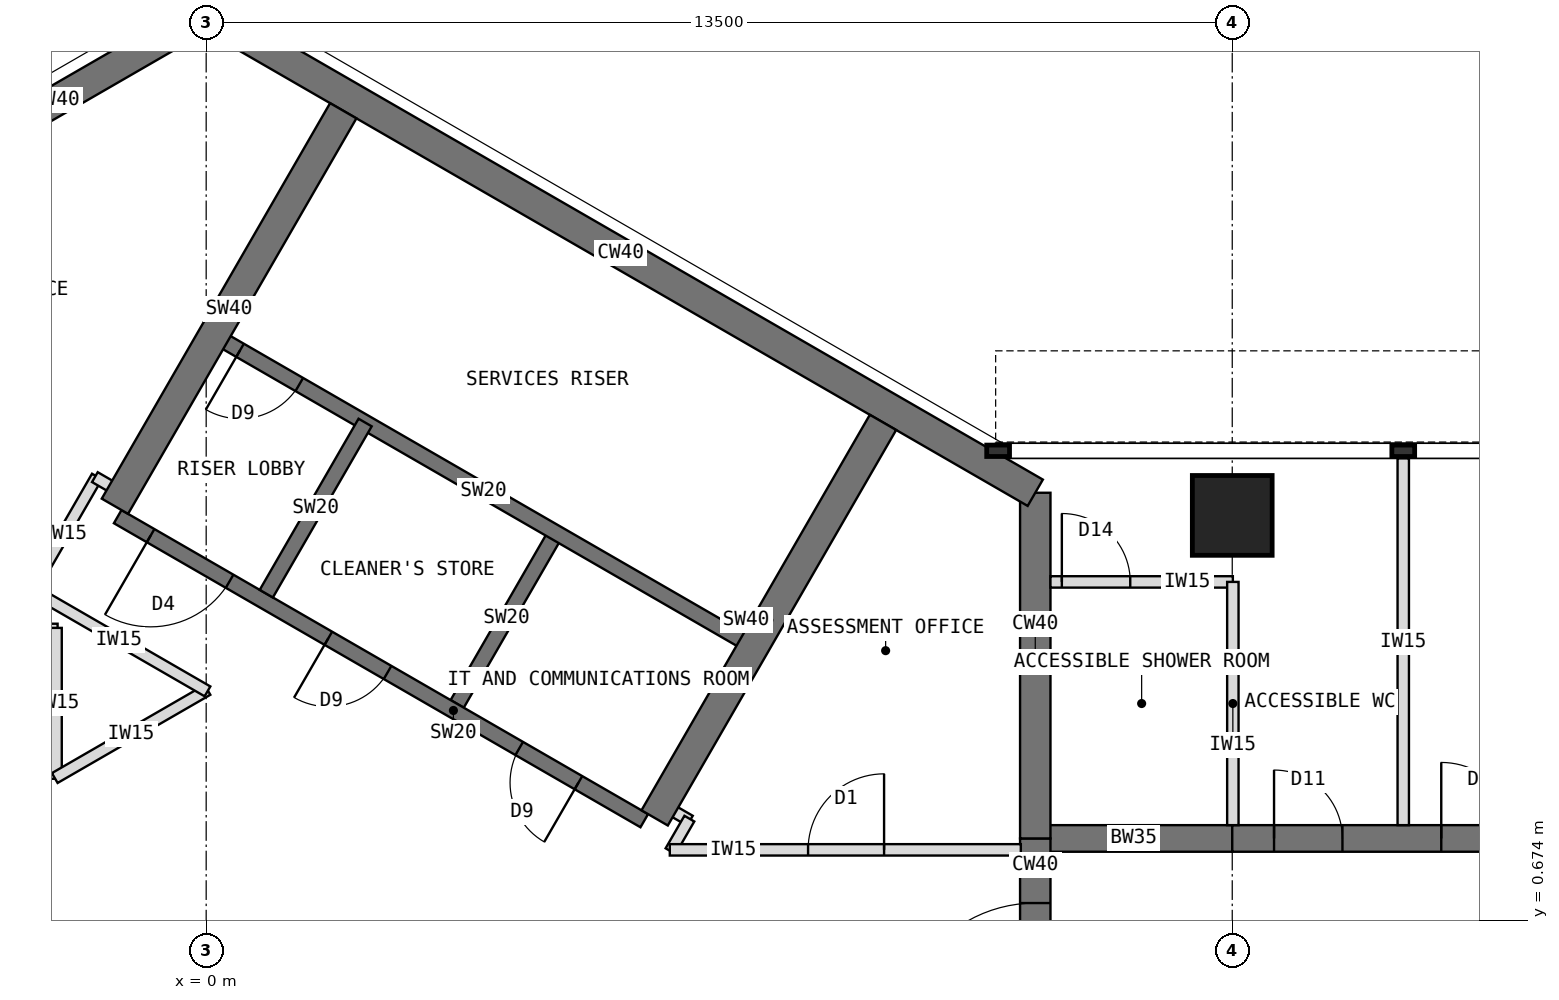
"""IFC4 building model, lengths in metres.
Left out: names, types, materials, properties, quantities, classifications, styles, units other than length and angle.
Written with IfcOpenShell. Run it as: python <this file> out.ifc"""

import sys

from ifc_helpers import new_model, si_unit, direction, frame, frame_2d, origin, origin_2d, place, context, subcontext, project, spatial, rectangle, extrude, element, fill, save


model = new_model("IFC4")
c1 = context("Model", 3, precision=1e-05, world=origin(), true_north=direction((0.0, 1.0)))
c2 = subcontext(c1, "Body", "Model", "MODEL_VIEW")
j1 = project(units=[si_unit("LENGTHUNIT", "METRE"), si_unit("PLANEANGLEUNIT", "RADIAN")], contexts=[c1])
p1 = place(None, origin())
s1 = spatial("IfcSite", under=j1, at=p1, CompositionType="ELEMENT")
p2 = place(p1, origin())
s2 = spatial("IfcBuilding", under=s1, at=p2, CompositionType="ELEMENT")
p3 = place(p2, frame((0.0, 0.0, 251.5)))
s3 = spatial("IfcBuildingStorey", under=s2, at=p3, CompositionType="ELEMENT", Elevation=251.5)
p4 = place(p3, frame((10.908, -1.75, 0.0), z_axis=(0.0, 0.0, 1.0), x_axis=(0.0, 1.0, 0.0)))
e1 = element("IfcWall", 1, at=p4, inside=s3, PredefinedType="SHEAR", context=c2, shape_type="SweptSolid", body=[
    extrude(rectangle(XDim=3.5, YDim=0.4, at=frame_2d((1.75, 0.0))), origin(), (0.0, 0.0, 1.0), 4.0),
])
p5 = place(p4, frame((0.85, 0.0, 0.0)))
e2 = element("IfcOpeningElement", 2, at=p5, cuts=e1, PredefinedType="OPENING", context=c2, shape_type="SweptSolid", body=[
    extrude(rectangle(XDim=1.8, YDim=2.1, at=frame_2d((0.9, 1.05))), frame((0.0, 0.21, 0.0), z_axis=(0.0, -1.0, 0.0), x_axis=(1.0, 0.0, 0.0)), (0.0, 0.0, 1.0), 0.42),
])
p6 = place(p3, frame((10.908, 1.75, 0.0), z_axis=(0.0, 0.0, 1.0), x_axis=(0.0, 1.0, 0.0)))
e3 = element("IfcWall", 3, at=p6, inside=s3, PredefinedType="SHEAR", context=c2, shape_type="SweptSolid", body=[
    extrude(rectangle(XDim=4.548, YDim=0.4, at=frame_2d((2.274, 0.0))), origin(), (0.0, 0.0, 1.0), 4.0),
])
p7 = place(p3, frame((10.908, 6.298, 0.0), z_axis=(0.0, 0.0, 1.0), x_axis=(-0.866021940709, 0.500005998175, 0.0)))
e4 = element("IfcWall", 4, at=p7, inside=s3, PredefinedType="SHEAR", context=c2, shape_type="SweptSolid", body=[
    extrude(rectangle(XDim=12.596, YDim=0.4, at=frame_2d((6.298, 0.0))), origin(), (0.0, 0.0, 1.0), 4.0),
])
p8 = place(p3, frame((0.0, 12.596, 0.0), z_axis=(0.0, 0.0, 1.0), x_axis=(-0.866011268655, -0.500024481964, 0.0)))
e5 = element("IfcWall", 5, at=p8, inside=s3, PredefinedType="SHEAR", context=c2, shape_type="SweptSolid", body=[
    extrude(rectangle(XDim=4.548, YDim=0.4, at=frame_2d((2.274, 0.0))), origin(), (0.0, 0.0, 1.0), 4.0),
])
p9 = place(p3, frame((10.908, 1.75, 0.0), z_axis=(0.0, 0.0, 1.0), x_axis=(1.0, 0.0, 0.0)))
e6 = element("IfcWall", 6, at=p9, inside=s3, PredefinedType="SHEAR", context=c2, shape_type="SweptSolid", body=[
    extrude(rectangle(XDim=2.592, YDim=0.35, at=frame_2d((1.296, 0.0))), origin(), (0.0, 0.0, 1.0), 4.0),
])
p10 = place(p3, frame((13.5, 1.75, 0.0), z_axis=(0.0, 0.0, 1.0), x_axis=(1.0, 0.0, 0.0)))
e7 = element("IfcWall", 7, at=p10, inside=s3, PredefinedType="SHEAR", context=c2, shape_type="SweptSolid", body=[
    extrude(rectangle(XDim=13.2, YDim=0.35, at=frame_2d((6.6, 0.0))), origin(), (0.0, 0.0, 1.0), 4.0),
])
p11 = place(p10, frame((0.55, 0.0, 0.0)))
e8 = element("IfcOpeningElement", 8, at=p11, cuts=e7, PredefinedType="OPENING", context=c2, shape_type="SweptSolid", body=[
    extrude(rectangle(XDim=0.9, YDim=2.1, at=frame_2d((0.45, 1.05))), frame((0.0, 0.185, 0.0), z_axis=(0.0, -1.0, 0.0), x_axis=(1.0, 0.0, 0.0)), (0.0, 0.0, 1.0), 0.37),
])
p12 = place(p10, frame((2.75, 0.0, 0.0)))
e9 = element("IfcOpeningElement", 9, at=p12, cuts=e7, PredefinedType="OPENING", context=c2, shape_type="SweptSolid", body=[
    extrude(rectangle(XDim=1.0, YDim=2.1, at=frame_2d((0.5, 1.05))), frame((0.0, 0.185, 0.0), z_axis=(0.0, -1.0, 0.0), x_axis=(1.0, 0.0, 0.0)), (0.0, 0.0, 1.0), 0.37),
])
p13 = place(p10, frame((7.25, 0.0, 0.0)))
e10 = element("IfcOpeningElement", 10, at=p13, cuts=e7, PredefinedType="OPENING", context=c2, shape_type="SweptSolid", body=[
    extrude(rectangle(XDim=1.0, YDim=2.1, at=frame_2d((0.5, 1.05))), frame((0.0, 0.185, 0.0), z_axis=(0.0, -1.0, 0.0), x_axis=(1.0, 0.0, 0.0)), (0.0, 0.0, 1.0), 0.37),
])
p14 = place(p3, frame((13.5, 6.0, 0.0), z_axis=(0.0, 0.0, 1.0), x_axis=(1.0, 0.0, 0.0)))
e11 = element("IfcColumn", 11, at=p14, inside=s3, PredefinedType="COLUMN", context=c2, shape_type="SweptSolid", body=[
    extrude(rectangle(XDim=1.05, YDim=1.05, at=origin_2d()), origin(), (0.0, 0.0, 1.0), 4.0),
])
p15 = place(p3, frame((5.764, 1.984, 0.0), z_axis=(0.0, 0.0, 1.0), x_axis=(-0.866026010844, 0.49999894854, 0.0)))
e12 = element("IfcWall", 12, at=p15, inside=s3, PredefinedType="SHEAR", context=c2, shape_type="SweptSolid", body=[
    extrude(rectangle(XDim=8.0, YDim=0.2, at=frame_2d((4.0, 0.0))), origin(), (0.0, 0.0, 1.0), 4.0),
])
p16 = place(p15, frame((6.3, 0.0, 0.0)))
e13 = element("IfcOpeningElement", 13, at=p16, cuts=e12, PredefinedType="OPENING", context=c2, shape_type="SweptSolid", body=[
    extrude(rectangle(XDim=1.2, YDim=2.1, at=frame_2d((0.6, 1.05))), frame((0.0, 0.11, 0.0), z_axis=(0.0, -1.0, 0.0), x_axis=(1.0, 0.0, 0.0)), (0.0, 0.0, 1.0), 0.22),
])
p17 = place(p15, frame((1.0, 0.0, 0.0)))
e14 = element("IfcOpeningElement", 14, at=p17, cuts=e12, PredefinedType="OPENING", context=c2, shape_type="SweptSolid", body=[
    extrude(rectangle(XDim=0.9, YDim=2.1, at=frame_2d((0.45, 1.05))), frame((0.0, 0.11, 0.0), z_axis=(0.0, -1.0, 0.0), x_axis=(1.0, 0.0, 0.0)), (0.0, 0.0, 1.0), 0.22),
])
p18 = place(p15, frame((3.9, 0.0, 0.0)))
e15 = element("IfcOpeningElement", 15, at=p18, cuts=e12, PredefinedType="OPENING", context=c2, shape_type="SweptSolid", body=[
    extrude(rectangle(XDim=0.9, YDim=2.1, at=frame_2d((0.45, 1.05))), frame((0.0, 0.11, 0.0), z_axis=(0.0, -1.0, 0.0), x_axis=(1.0, 0.0, 0.0)), (0.0, 0.0, 1.0), 0.22),
])
for number, where, z_axis, x_axis in (
    (16, (3.303, 3.52, 0.0), (0.0, 0.0, 1.0), (0.5, 0.866, 0.0)),
    (17, (0.791, 4.97, 0.0), (0.0, 0.0, 1.0), (0.5, 0.866, 0.0)),
):
    element("IfcWall", number, at=place(p3, frame(where, z_axis=z_axis, x_axis=x_axis)), inside=s3, PredefinedType="SHEAR", context=c2, shape_type="SweptSolid", body=[
        extrude(rectangle(XDim=2.6, YDim=0.2, at=frame_2d((1.3, 0.0))), origin(), (0.0, 0.0, 1.0), 4.0),
    ])
p19 = place(p3, frame((7.114, 4.322, 0.0), z_axis=(0.0, 0.0, 1.0), x_axis=(-0.866026010844, 0.49999894854, 0.0)))
e18 = element("IfcWall", 18, at=p19, inside=s3, PredefinedType="SHEAR", context=c2, shape_type="SweptSolid", body=[
    extrude(rectangle(XDim=8.0, YDim=0.2, at=frame_2d((4.0, 0.0))), origin(), (0.0, 0.0, 1.0), 4.0),
])
p20 = place(p19, frame((6.8, 0.0, 0.0)))
e19 = element("IfcOpeningElement", 19, at=p20, cuts=e18, PredefinedType="OPENING", context=c2, shape_type="SweptSolid", body=[
    extrude(rectangle(XDim=0.9, YDim=2.1, at=frame_2d((0.45, 1.05))), frame((0.0, 0.11, 0.0), z_axis=(0.0, -1.0, 0.0), x_axis=(1.0, 0.0, 0.0)), (0.0, 0.0, 1.0), 0.22),
])
for number, where, z_axis, x_axis in (
    (20, (-1.201, 6.12, 0.0), (0.0, 0.0, 1.0), (0.5, 0.866, 0.0)),
    (21, (5.901, 2.02, 0.0), (0.0, 0.0, 1.0), (0.5, 0.866, 0.0)),
):
    element("IfcWall", number, at=place(p3, frame(where, z_axis=z_axis, x_axis=x_axis)), inside=s3, PredefinedType="SHEAR", context=c2, shape_type="SweptSolid", body=[
        extrude(rectangle(XDim=6.008, YDim=0.4, at=frame_2d((3.004, 0.0))), origin(), (0.0, 0.0, 1.0), 4.0),
    ])
p21 = place(p3, frame((15.75, 1.925, 0.0), z_axis=(0.0, 0.0, 1.0), x_axis=(0.0, 1.0, 0.0)))
e22 = element("IfcWall", 22, at=p21, inside=s3, PredefinedType="PARTITIONING", context=c2, shape_type="SweptSolid", body=[
    extrude(rectangle(XDim=4.825, YDim=0.15, at=frame_2d((2.413, 0.0))), origin(), (0.0, 0.0, 1.0), 3.8),
])
p22 = place(p3, frame((11.108, 5.125, 0.0), z_axis=(0.0, 0.0, 1.0), x_axis=(1.0, 0.0, 0.0)))
e23 = element("IfcWall", 23, at=p22, inside=s3, PredefinedType="PARTITIONING", context=c2, shape_type="SweptSolid", body=[
    extrude(rectangle(XDim=2.4, YDim=0.15, at=frame_2d((1.2, 0.0))), origin(), (0.0, 0.0, 1.0), 3.8),
])
p23 = place(p22, frame((0.15, 0.0, 0.0)))
e24 = element("IfcOpeningElement", 24, at=p23, cuts=e23, PredefinedType="OPENING", context=c2, shape_type="SweptSolid", body=[
    extrude(rectangle(XDim=0.9, YDim=2.1, at=frame_2d((0.45, 1.05))), frame((0.0, 0.085, 0.0), z_axis=(0.0, -1.0, 0.0), x_axis=(1.0, 0.0, 0.0)), (0.0, 0.0, 1.0), 0.17),
])
p24 = place(p3, frame((13.508, 1.925, 0.0), z_axis=(0.0, 0.0, 1.0), x_axis=(0.0, 1.0, 0.0)))
e25 = element("IfcWall", 25, at=p24, inside=s3, PredefinedType="PARTITIONING", context=c2, shape_type="SweptSolid", body=[
    extrude(rectangle(XDim=3.2, YDim=0.15, at=frame_2d((1.6, 0.0))), origin(), (0.0, 0.0, 1.0), 3.267),
])
p25 = place(p3, frame((-4.92, 4.5, 0.0), z_axis=(0.0, 0.0, 1.0), x_axis=(1.0, 0.0, 0.0)))
e26 = element("IfcWall", 26, at=p25, inside=s3, PredefinedType="PARTITIONING", context=c2, shape_type="SweptSolid", body=[
    extrude(rectangle(XDim=2.965, YDim=0.15, at=frame_2d((1.482, 0.0))), origin(), (0.0, 0.0, 1.0), 3.8),
])
p26 = place(p25, frame((0.982, 0.0, 0.0)))
e27 = element("IfcOpeningElement", 27, at=p26, cuts=e26, PredefinedType="OPENING", context=c2, shape_type="SweptSolid", body=[
    extrude(rectangle(XDim=1.0, YDim=2.1, at=frame_2d((0.5, 1.05))), frame((0.0, 0.085, 0.0), z_axis=(0.0, -1.0, 0.0), x_axis=(1.0, 0.0, 0.0)), (0.0, 0.0, 1.0), 0.17),
])
p27 = place(p3, frame((-1.975, 4.52, 0.0), z_axis=(0.0, 0.0, 1.0), x_axis=(0.0, -1.0, 0.0)))
e28 = element("IfcWall", 28, at=p27, inside=s3, PredefinedType="PARTITIONING", context=c2, shape_type="SweptSolid", body=[
    extrude(rectangle(XDim=1.985, YDim=0.15, at=frame_2d((0.993, 0.0))), origin(), (0.0, 0.0, 1.0), 3.8),
])
p28 = place(p3, frame((-1.992, 2.545, 0.0), z_axis=(0.0, 0.0, 1.0), x_axis=(0.866059450854, 0.499941024108, 0.0)))
e29 = element("IfcWall", 29, at=p28, inside=s3, PredefinedType="PARTITIONING", context=c2, shape_type="SweptSolid", body=[
    extrude(rectangle(XDim=2.321, YDim=0.15, at=frame_2d((1.16, 0.0))), origin(), (0.0, 0.0, 1.0), 3.8),
])
p29 = place(p3, frame((0.017, 3.685, 0.0), z_axis=(0.0, 0.0, 1.0), x_axis=(-0.866036099759, 0.499981473571, 0.0)))
e30 = element("IfcWall", 30, at=p29, inside=s3, PredefinedType="PARTITIONING", context=c2, shape_type="SweptSolid", body=[
    extrude(rectangle(XDim=2.692, YDim=0.15, at=frame_2d((1.346, 0.0))), origin(), (0.0, 0.0, 1.0), 3.8),
])
p30 = place(p3, frame((-2.307, 5.004, 0.0), z_axis=(0.0, 0.0, 1.0), x_axis=(0.500062521093, 0.865989304205, 0.0)))
e31 = element("IfcWall", 31, at=p30, inside=s3, PredefinedType="PARTITIONING", context=c2, shape_type="SweptSolid", body=[
    extrude(rectangle(XDim=1.74, YDim=0.15, at=frame_2d((0.87, 0.0))), origin(), (0.0, 0.0, 1.0), 3.8),
])
for number, where, z_axis, x_axis in (
    (32, (-1.464, 6.503, 0.0), (0.0, 0.0, 1.0), (0.866, -0.5, 0.0)),
    (33, (5.992, 2.198, 0.0), (0.0, 0.0, 1.0), (0.866, -0.5, 0.0)),
):
    element("IfcWall", number, at=place(p3, frame(where, z_axis=z_axis, x_axis=x_axis)), inside=s3, PredefinedType="PARTITIONING", context=c2, shape_type="SweptSolid", body=[
        extrude(rectangle(XDim=0.43, YDim=0.15, at=frame_2d((0.215, 0.0))), origin(), (0.0, 0.0, 1.0), 3.8),
    ])
p31 = place(p3, frame((6.357, 2.011, 0.0), z_axis=(0.0, 0.0, 1.0), x_axis=(-0.50033519877, -0.865831790172, 0.0)))
e34 = element("IfcWall", 34, at=p31, inside=s3, PredefinedType="PARTITIONING", context=c2, shape_type="SweptSolid", body=[
    extrude(rectangle(XDim=0.494, YDim=0.15, at=frame_2d((0.247, 0.0))), origin(), (0.0, 0.0, 1.0), 3.8),
])
p32 = place(p3, frame((6.1, 1.6, 0.0), z_axis=(0.0, 0.0, 1.0), x_axis=(1.0, 0.0, 0.0)))
e35 = element("IfcWall", 35, at=p32, inside=s3, PredefinedType="PARTITIONING", context=c2, shape_type="SweptSolid", body=[
    extrude(rectangle(XDim=4.618, YDim=0.15, at=frame_2d((2.309, 0.0))), origin(), (0.0, 0.0, 1.0), 3.8),
])
p33 = place(p32, frame((1.819, 0.0, 0.0)))
e36 = element("IfcOpeningElement", 36, at=p33, cuts=e35, PredefinedType="OPENING", context=c2, shape_type="SweptSolid", body=[
    extrude(rectangle(XDim=1.0, YDim=2.1, at=frame_2d((0.5, 1.05))), frame((0.0, 0.085, 0.0), z_axis=(0.0, -1.0, 0.0), x_axis=(1.0, 0.0, 0.0)), (0.0, 0.0, 1.0), 0.17),
])
p34 = place(p16, origin())
e37 = element("IfcDoor", 37, at=p34, inside=s3, OperationType="SINGLE_SWING_RIGHT", PredefinedType="DOOR", context=c2, shape_type="SweptSolid", body=[
    extrude(rectangle(XDim=1.2, YDim=2.1, at=frame_2d((0.6, 1.05))), frame((0.0, 0.025, 0.0), z_axis=(0.0, -1.0, 0.0), x_axis=(1.0, 0.0, 0.0)), (0.0, 0.0, 1.0), 0.05),
])
fill(e13, e37)
p35 = place(p20, origin())
e38 = element("IfcDoor", 38, at=p35, inside=s3, OperationType="SINGLE_SWING_RIGHT", PredefinedType="DOOR", context=c2, shape_type="SweptSolid", body=[
    extrude(rectangle(XDim=0.9, YDim=2.1, at=frame_2d((0.45, 1.05))), frame((0.0, 0.025, 0.0), z_axis=(0.0, -1.0, 0.0), x_axis=(1.0, 0.0, 0.0)), (0.0, 0.0, 1.0), 0.05),
])
fill(e19, e38)
p36 = place(p5, origin())
e39 = element("IfcDoor", 39, at=p36, inside=s3, OperationType="DOUBLE_DOOR_DOUBLE_SWING", PredefinedType="DOOR", context=c2, shape_type="SweptSolid", body=[
    extrude(rectangle(XDim=1.8, YDim=2.1, at=frame_2d((0.9, 1.05))), frame((0.0, 0.025, 0.0), z_axis=(0.0, -1.0, 0.0), x_axis=(1.0, 0.0, 0.0)), (0.0, 0.0, 1.0), 0.05),
])
fill(e2, e39)
p37 = place(p23, origin())
e40 = element("IfcDoor", 40, at=p37, inside=s3, OperationType="SINGLE_SWING_LEFT", PredefinedType="DOOR", context=c2, shape_type="SweptSolid", body=[
    extrude(rectangle(XDim=0.9, YDim=2.1, at=frame_2d((0.45, 1.05))), frame((0.0, 0.025, 0.0), z_axis=(0.0, -1.0, 0.0), x_axis=(1.0, 0.0, 0.0)), (0.0, 0.0, 1.0), 0.05),
])
fill(e24, e40)
p38 = place(p33, origin())
e41 = element("IfcDoor", 41, at=p38, inside=s3, OperationType="SINGLE_SWING_RIGHT", PredefinedType="DOOR", context=c2, shape_type="SweptSolid", body=[
    extrude(rectangle(XDim=1.0, YDim=2.1, at=frame_2d((0.5, 1.05))), frame((0.0, 0.025, 0.0), z_axis=(0.0, -1.0, 0.0), x_axis=(1.0, 0.0, 0.0)), (0.0, 0.0, 1.0), 0.05),
])
fill(e36, e41)
p39 = place(p11, origin())
e42 = element("IfcDoor", 42, at=p39, inside=s3, OperationType="SINGLE_SWING_LEFT", PredefinedType="DOOR", context=c2, shape_type="SweptSolid", body=[
    extrude(rectangle(XDim=0.9, YDim=2.1, at=frame_2d((0.45, 1.05))), frame((0.0, 0.025, 0.0), z_axis=(0.0, -1.0, 0.0), x_axis=(1.0, 0.0, 0.0)), (0.0, 0.0, 1.0), 0.05),
])
fill(e8, e42)
p40 = place(p12, origin())
e43 = element("IfcDoor", 43, at=p40, inside=s3, OperationType="SINGLE_SWING_LEFT", PredefinedType="DOOR", context=c2, shape_type="SweptSolid", body=[
    extrude(rectangle(XDim=1.0, YDim=2.1, at=frame_2d((0.5, 1.05))), frame((0.0, 0.025, 0.0), z_axis=(0.0, -1.0, 0.0), x_axis=(1.0, 0.0, 0.0)), (0.0, 0.0, 1.0), 0.05),
])
fill(e9, e43)
p41 = place(p17, origin())
e44 = element("IfcDoor", 44, at=p41, inside=s3, OperationType="SINGLE_SWING_LEFT", PredefinedType="DOOR", context=c2, shape_type="SweptSolid", body=[
    extrude(rectangle(XDim=0.9, YDim=2.1, at=frame_2d((0.45, 1.05))), frame((0.0, 0.025, 0.0), z_axis=(0.0, -1.0, 0.0), x_axis=(1.0, 0.0, 0.0)), (0.0, 0.0, 1.0), 0.05),
])
fill(e14, e44)
p42 = place(p18, origin())
e45 = element("IfcDoor", 45, at=p42, inside=s3, OperationType="SINGLE_SWING_RIGHT", PredefinedType="DOOR", context=c2, shape_type="SweptSolid", body=[
    extrude(rectangle(XDim=0.9, YDim=2.1, at=frame_2d((0.45, 1.05))), frame((0.0, 0.025, 0.0), z_axis=(0.0, -1.0, 0.0), x_axis=(1.0, 0.0, 0.0)), (0.0, 0.0, 1.0), 0.05),
])
fill(e15, e45)
save(model, sys.argv[1])
